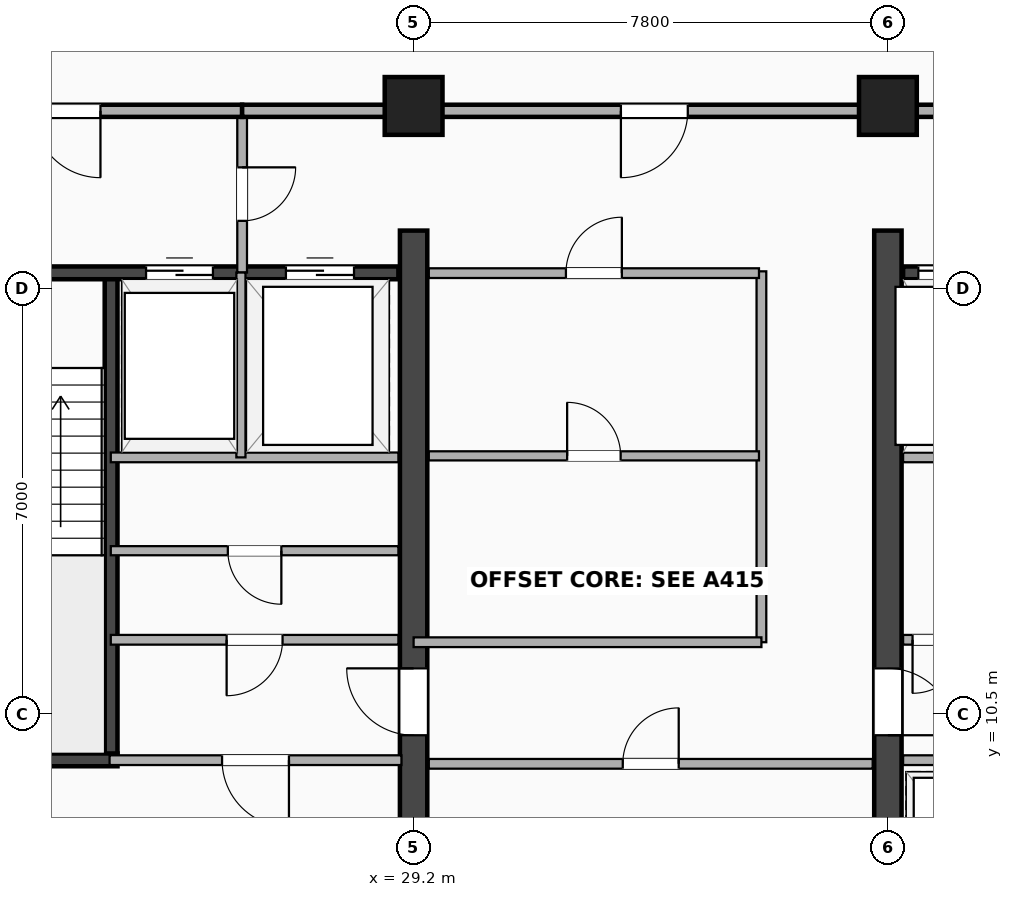
"""IFC4 building model, lengths in metres.
Left out: names, types, materials, properties, quantities, classifications, styles, units other than length and angle.
Written with IfcOpenShell. Run it as: python <this file> out.ifc"""

import sys

from ifc_helpers import new_model, si_unit, direction, frame, frame_2d, origin, origin_2d, place, context, subcontext, project, spatial, rectangle, extrude, element, fill, save


model = new_model("IFC4")
c1 = context("Model", 3, precision=1e-05, world=origin(), true_north=direction((0.0, 1.0)))
c2 = subcontext(c1, "Body", "Model", "MODEL_VIEW")
j1 = project(units=[si_unit("LENGTHUNIT", "METRE"), si_unit("PLANEANGLEUNIT", "RADIAN")], contexts=[c1])
p1 = place(None, origin())
s1 = spatial("IfcSite", under=j1, at=p1, CompositionType="ELEMENT")
p2 = place(p1, origin())
s2 = spatial("IfcBuilding", under=s1, at=p2, CompositionType="ELEMENT")
p3 = place(p2, frame((0.0, 0.0, 192.5)))
s3 = spatial("IfcBuildingStorey", under=s2, at=p3, CompositionType="ELEMENT", Elevation=192.5)
p4 = place(p3, frame((29.2, 3.5, 0.0), z_axis=(0.0, 0.0, 1.0), x_axis=(0.0, 1.0, 0.0)))
e1 = element("IfcWall", 1, at=p4, inside=s3, PredefinedType="SHEAR", context=c2, shape_type="SweptSolid", body=[
    extrude(rectangle(XDim=14.95, YDim=0.45, at=frame_2d((7.475, 0.0))), origin(), (0.0, 0.0, 1.0), 4.16),
])
p5 = place(p4, frame((7.75, 0.0, 0.0), z_axis=(0.0, 0.0, 1.0), x_axis=(-1.0, 0.0, 0.0)))
e2 = element("IfcOpeningElement", 2, at=p5, cuts=e1, PredefinedType="OPENING", context=c2, shape_type="SweptSolid", body=[
    extrude(rectangle(XDim=1.1, YDim=2.15, at=frame_2d((0.55, 1.075))), frame((0.0, 0.235, 0.0), z_axis=(0.0, -1.0, 0.0), x_axis=(1.0, 0.0, 0.0)), (0.0, 0.0, 1.0), 0.47),
])
p6 = place(p3, frame((37.0, 3.5, 0.0), z_axis=(0.0, 0.0, 1.0), x_axis=(0.0, 1.0, 0.0)))
e3 = element("IfcWall", 3, at=p6, inside=s3, PredefinedType="SHEAR", context=c2, shape_type="SweptSolid", body=[
    extrude(rectangle(XDim=14.95, YDim=0.45, at=frame_2d((7.475, 0.0))), origin(), (0.0, 0.0, 1.0), 4.16),
])
p7 = place(p6, frame((6.65, 0.0, 0.0)))
e4 = element("IfcOpeningElement", 4, at=p7, cuts=e3, PredefinedType="OPENING", context=c2, shape_type="SweptSolid", body=[
    extrude(rectangle(XDim=1.1, YDim=2.15, at=frame_2d((0.55, 1.075))), frame((0.0, 0.235, 0.0), z_axis=(0.0, -1.0, 0.0), x_axis=(1.0, 0.0, 0.0)), (0.0, 0.0, 1.0), 0.47),
])
p8 = place(p3, frame((24.225, 9.745, 0.0), z_axis=(0.0, 0.0, 1.0), x_axis=(0.0, 1.0, 0.0)))
e5 = element("IfcWall", 5, at=p8, inside=s3, PredefinedType="SHEAR", context=c2, shape_type="SweptSolid", body=[
    extrude(rectangle(XDim=8.01, YDim=0.21, at=frame_2d((4.005, 0.0))), origin(), (0.0, 0.0, 1.0), 4.16),
])
p9 = place(p3, frame((20.67, 9.745, 0.0), z_axis=(0.0, 0.0, 1.0), x_axis=(1.0, 0.0, 0.0)))
e6 = element("IfcWall", 6, at=p9, inside=s3, PredefinedType="SHEAR", context=c2, shape_type="SweptSolid", body=[
    extrude(rectangle(XDim=3.66, YDim=0.21, at=frame_2d((1.83, 0.0))), origin(), (0.0, 0.0, 1.0), 4.16),
])
p10 = place(p3, frame((20.65, 17.755, 0.0), z_axis=(0.0, 0.0, 1.0), x_axis=(1.0, 0.0, 0.0)))
e7 = element("IfcWall", 7, at=p10, inside=s3, PredefinedType="SHEAR", context=c2, shape_type="SweptSolid", body=[
    extrude(rectangle(XDim=8.3, YDim=0.21, at=frame_2d((4.15, 0.0))), origin(), (0.0, 0.0, 1.0), 4.16),
])
p11 = place(p10, frame((2.2, 0.0, 0.0), z_axis=(0.0, 0.0, 1.0), x_axis=(-1.0, 0.0, 0.0)))
e8 = element("IfcOpeningElement", 8, at=p11, cuts=e7, PredefinedType="OPENING", context=c2, shape_type="SweptSolid", body=[
    extrude(rectangle(XDim=1.05, YDim=2.15, at=frame_2d((0.525, 1.075))), frame((0.0, 0.115, 0.0), z_axis=(0.0, -1.0, 0.0), x_axis=(1.0, 0.0, 0.0)), (0.0, 0.0, 1.0), 0.23),
])
p12 = place(p10, frame((4.15, 0.0, 0.0)))
e9 = element("IfcOpeningElement", 9, at=p12, cuts=e7, PredefinedType="OPENING", context=c2, shape_type="SweptSolid", body=[
    extrude(rectangle(XDim=1.1, YDim=2.18, at=frame_2d((0.55, 1.09))), frame((0.0, 0.115, 0.0), z_axis=(0.0, -1.0, 0.0), x_axis=(1.0, 0.0, 0.0)), (0.0, 0.0, 1.0), 0.23),
])
p13 = place(p10, frame((6.45, 0.0, 0.0)))
e10 = element("IfcOpeningElement", 10, at=p13, cuts=e7, PredefinedType="OPENING", context=c2, shape_type="SweptSolid", body=[
    extrude(rectangle(XDim=1.12, YDim=2.2, at=frame_2d((0.56, 1.1))), frame((0.0, 0.115, 0.0), z_axis=(0.0, -1.0, 0.0), x_axis=(1.0, 0.0, 0.0)), (0.0, 0.0, 1.0), 0.23),
])
p14 = place(p3, frame((37.25, 17.755, 0.0), z_axis=(0.0, 0.0, 1.0), x_axis=(1.0, 0.0, 0.0)))
e11 = element("IfcWall", 11, at=p14, inside=s3, PredefinedType="SHEAR", context=c2, shape_type="SweptSolid", body=[
    extrude(rectangle(XDim=7.2, YDim=0.21, at=frame_2d((3.6, 0.0))), origin(), (0.0, 0.0, 1.0), 4.16),
])
p15 = place(p14, frame((0.25, 0.0, 0.0)))
e12 = element("IfcOpeningElement", 12, at=p15, cuts=e11, PredefinedType="OPENING", context=c2, shape_type="SweptSolid", body=[
    extrude(rectangle(XDim=1.12, YDim=2.2, at=frame_2d((0.56, 1.1))), frame((0.0, 0.115, 0.0), z_axis=(0.0, -1.0, 0.0), x_axis=(1.0, 0.0, 0.0)), (0.0, 0.0, 1.0), 0.23),
])
p16 = place(p14, frame((2.05, 0.0, 0.0)))
e13 = element("IfcOpeningElement", 13, at=p16, cuts=e11, PredefinedType="OPENING", context=c2, shape_type="SweptSolid", body=[
    extrude(rectangle(XDim=1.1, YDim=2.18, at=frame_2d((0.55, 1.09))), frame((0.0, 0.115, 0.0), z_axis=(0.0, -1.0, 0.0), x_axis=(1.0, 0.0, 0.0)), (0.0, 0.0, 1.0), 0.23),
])
p17 = place(p14, frame((5.78, 0.0, 0.0), z_axis=(0.0, 0.0, 1.0), x_axis=(-1.0, 0.0, 0.0)))
e14 = element("IfcOpeningElement", 14, at=p17, cuts=e11, PredefinedType="OPENING", context=c2, shape_type="SweptSolid", body=[
    extrude(rectangle(XDim=1.05, YDim=2.15, at=frame_2d((0.525, 1.075))), frame((0.0, 0.115, 0.0), z_axis=(0.0, -1.0, 0.0), x_axis=(1.0, 0.0, 0.0)), (0.0, 0.0, 1.0), 0.23),
])
for number, where, z_axis, x_axis in (
    (15, (29.2, 20.5, -0.24), (0.0, 0.0, 1.0), (1.0, 0.0, 0.0)),
    (16, (37.0, 20.5, -0.24), (0.0, 0.0, 1.0), (1.0, 0.0, 0.0)),
):
    element("IfcColumn", number, at=place(p3, frame(where, z_axis=z_axis, x_axis=x_axis)), inside=s3, PredefinedType="COLUMN", context=c2, shape_type="SweptSolid", body=[
        extrude(rectangle(XDim=0.95, YDim=0.95, at=origin_2d()), origin(), (0.0, 0.0, 1.0), 4.4),
    ])
p18 = place(p3, frame((26.38, 17.76, 0.0), z_axis=(0.0, 0.0, 1.0), x_axis=(0.0, 1.0, 0.0)))
e17 = element("IfcWall", 17, at=p18, inside=s3, PredefinedType="PARTITIONING", context=c2, shape_type="SweptSolid", body=[
    extrude(rectangle(XDim=2.66, YDim=0.16, at=frame_2d((1.33, 0.0))), origin(), (0.0, 0.0, 1.0), 3.606),
])
p19 = place(p18, frame((0.85, 0.0, 0.0)))
e18 = element("IfcOpeningElement", 18, at=p19, cuts=e17, PredefinedType="OPENING", context=c2, shape_type="SweptSolid", body=[
    extrude(rectangle(XDim=0.88, YDim=2.08, at=frame_2d((0.44, 1.04))), frame((0.0, 0.09, 0.0), z_axis=(0.0, -1.0, 0.0), x_axis=(1.0, 0.0, 0.0)), (0.0, 0.0, 1.0), 0.18),
])
p20 = place(p3, frame((24.22, 14.72, 0.0), z_axis=(0.0, 0.0, 1.0), x_axis=(1.0, 0.0, 0.0)))
e19 = element("IfcWall", 19, at=p20, inside=s3, PredefinedType="PARTITIONING", context=c2, shape_type="SweptSolid", body=[
    extrude(rectangle(XDim=4.73, YDim=0.16, at=frame_2d((2.365, 0.0))), origin(), (0.0, 0.0, 1.0), 4.16),
])
p21 = place(p3, frame((26.36, 14.72, 0.0), z_axis=(0.0, 0.0, 1.0), x_axis=(0.0, 1.0, 0.0)))
e20 = element("IfcWall", 20, at=p21, inside=s3, PredefinedType="PARTITIONING", context=c2, shape_type="SweptSolid", body=[
    extrude(rectangle(XDim=3.04, YDim=0.15, at=frame_2d((1.52, 0.0))), origin(), (0.0, 0.0, 1.0), 4.16),
])
p22 = place(p3, frame((37.25, 14.72, 0.0), z_axis=(0.0, 0.0, 1.0), x_axis=(1.0, 0.0, 0.0)))
e21 = element("IfcWall", 21, at=p22, inside=s3, PredefinedType="PARTITIONING", context=c2, shape_type="SweptSolid", body=[
    extrude(rectangle(XDim=3.61, YDim=0.16, at=frame_2d((1.805, 0.0))), origin(), (0.0, 0.0, 1.0), 4.16),
])
p23 = place(p3, frame((20.65, 20.42, 0.0), z_axis=(0.0, 0.0, 1.0), x_axis=(1.0, 0.0, 0.0)))
e22 = element("IfcWall", 22, at=p23, inside=s3, PredefinedType="PARTITIONING", context=c2, shape_type="SweptSolid", body=[
    extrude(rectangle(XDim=5.73, YDim=0.2, at=frame_2d((2.865, 0.0))), origin(), (0.0, 0.0, 1.0), 3.372),
])
p24 = place(p23, frame((2.3, 0.0, 0.0)))
e23 = element("IfcOpeningElement", 23, at=p24, cuts=e22, PredefinedType="OPENING", context=c2, shape_type="SweptSolid", body=[
    extrude(rectangle(XDim=1.1, YDim=2.15, at=frame_2d((0.55, 1.075))), frame((0.0, 0.11, 0.0), z_axis=(0.0, -1.0, 0.0), x_axis=(1.0, 0.0, 0.0)), (0.0, 0.0, 1.0), 0.22),
])
p25 = place(p3, frame((26.38, 20.42, 0.0), z_axis=(0.0, 0.0, 1.0), x_axis=(1.0, 0.0, 0.0)))
e24 = element("IfcWall", 24, at=p25, inside=s3, PredefinedType="PARTITIONING", context=c2, shape_type="SweptSolid", body=[
    extrude(rectangle(XDim=2.82, YDim=0.2, at=frame_2d((1.41, 0.0))), origin(), (0.0, 0.0, 1.0), 3.372),
])
p26 = place(p3, frame((29.2, 20.42, 0.0), z_axis=(0.0, 0.0, 1.0), x_axis=(1.0, 0.0, 0.0)))
e25 = element("IfcWall", 25, at=p26, inside=s3, PredefinedType="PARTITIONING", context=c2, shape_type="SweptSolid", body=[
    extrude(rectangle(XDim=7.8, YDim=0.2, at=frame_2d((3.9, 0.0))), origin(), (0.0, 0.0, 1.0), 3.372),
])
p27 = place(p26, frame((3.409, 0.0, 0.0)))
e26 = element("IfcOpeningElement", 26, at=p27, cuts=e25, PredefinedType="OPENING", context=c2, shape_type="SweptSolid", body=[
    extrude(rectangle(XDim=1.1, YDim=2.15, at=frame_2d((0.55, 1.075))), frame((0.0, 0.11, 0.0), z_axis=(0.0, -1.0, 0.0), x_axis=(1.0, 0.0, 0.0)), (0.0, 0.0, 1.0), 0.22),
])
p28 = place(p3, frame((37.0, 20.42, 0.0), z_axis=(0.0, 0.0, 1.0), x_axis=(1.0, 0.0, 0.0)))
e27 = element("IfcWall", 27, at=p28, inside=s3, PredefinedType="PARTITIONING", context=c2, shape_type="SweptSolid", body=[
    extrude(rectangle(XDim=7.45, YDim=0.2, at=frame_2d((3.725, 0.0))), origin(), (0.0, 0.0, 1.0), 3.372),
])
p29 = place(p28, frame((4.2, 0.0, 0.0)))
e28 = element("IfcOpeningElement", 28, at=p29, cuts=e27, PredefinedType="OPENING", context=c2, shape_type="SweptSolid", body=[
    extrude(rectangle(XDim=1.1, YDim=2.15, at=frame_2d((0.55, 1.075))), frame((0.0, 0.11, 0.0), z_axis=(0.0, -1.0, 0.0), x_axis=(1.0, 0.0, 0.0)), (0.0, 0.0, 1.0), 0.22),
])
p30 = place(p3, frame((24.22, 11.72, 0.0), z_axis=(0.0, 0.0, 1.0), x_axis=(1.0, 0.0, 0.0)))
e29 = element("IfcWall", 29, at=p30, inside=s3, PredefinedType="PARTITIONING", context=c2, shape_type="SweptSolid", body=[
    extrude(rectangle(XDim=4.73, YDim=0.16, at=frame_2d((2.365, 0.0))), origin(), (0.0, 0.0, 1.0), 4.16),
])
p31 = place(p30, frame((1.905, 0.0, 0.0)))
e30 = element("IfcOpeningElement", 30, at=p31, cuts=e29, PredefinedType="OPENING", context=c2, shape_type="SweptSolid", body=[
    extrude(rectangle(XDim=0.92, YDim=2.08, at=frame_2d((0.46, 1.04))), frame((0.0, 0.09, 0.0), z_axis=(0.0, -1.0, 0.0), x_axis=(1.0, 0.0, 0.0)), (0.0, 0.0, 1.0), 0.18),
])
p32 = place(p3, frame((24.22, 13.185, 0.0), z_axis=(0.0, 0.0, 1.0), x_axis=(1.0, 0.0, 0.0)))
e31 = element("IfcWall", 31, at=p32, inside=s3, PredefinedType="PARTITIONING", context=c2, shape_type="SweptSolid", body=[
    extrude(rectangle(XDim=4.73, YDim=0.15, at=frame_2d((2.365, 0.0))), origin(), (0.0, 0.0, 1.0), 4.16),
])
p33 = place(p32, frame((1.925, 0.0, 0.0)))
e32 = element("IfcOpeningElement", 32, at=p33, cuts=e31, PredefinedType="OPENING", context=c2, shape_type="SweptSolid", body=[
    extrude(rectangle(XDim=0.88, YDim=2.08, at=frame_2d((0.44, 1.04))), frame((0.0, 0.085, 0.0), z_axis=(0.0, -1.0, 0.0), x_axis=(1.0, 0.0, 0.0)), (0.0, 0.0, 1.0), 0.17),
])
p34 = place(p3, frame((37.25, 11.72, 0.0), z_axis=(0.0, 0.0, 1.0), x_axis=(1.0, 0.0, 0.0)))
e33 = element("IfcWall", 33, at=p34, inside=s3, PredefinedType="PARTITIONING", context=c2, shape_type="SweptSolid", body=[
    extrude(rectangle(XDim=1.191, YDim=0.16, at=frame_2d((0.596, 0.0))), origin(), (0.0, 0.0, 1.0), 4.16),
])
p35 = place(p34, frame((0.156, 0.0, 0.0)))
e34 = element("IfcOpeningElement", 34, at=p35, cuts=e33, PredefinedType="OPENING", context=c2, shape_type="SweptSolid", body=[
    extrude(rectangle(XDim=0.88, YDim=2.08, at=frame_2d((0.44, 1.04))), frame((0.0, 0.09, 0.0), z_axis=(0.0, -1.0, 0.0), x_axis=(1.0, 0.0, 0.0)), (0.0, 0.0, 1.0), 0.18),
])
p36 = place(p3, frame((24.2, 9.74, 0.0), z_axis=(0.0, 0.0, 1.0), x_axis=(1.0, 0.0, 0.0)))
e35 = element("IfcWall", 35, at=p36, inside=s3, PredefinedType="PARTITIONING", context=c2, shape_type="SweptSolid", body=[
    extrude(rectangle(XDim=4.8, YDim=0.16, at=frame_2d((2.4, 0.0))), origin(), (0.0, 0.0, 1.0), 4.16),
])
p37 = place(p36, frame((1.85, 0.0, 0.0)))
e36 = element("IfcOpeningElement", 36, at=p37, cuts=e35, PredefinedType="OPENING", context=c2, shape_type="SweptSolid", body=[
    extrude(rectangle(XDim=1.1, YDim=2.15, at=frame_2d((0.55, 1.075))), frame((0.0, 0.09, 0.0), z_axis=(0.0, -1.0, 0.0), x_axis=(1.0, 0.0, 0.0)), (0.0, 0.0, 1.0), 0.18),
])
p38 = place(p3, frame((37.25, 9.74, 0.0), z_axis=(0.0, 0.0, 1.0), x_axis=(1.0, 0.0, 0.0)))
e37 = element("IfcWall", 37, at=p38, inside=s3, PredefinedType="PARTITIONING", context=c2, shape_type="SweptSolid", body=[
    extrude(rectangle(XDim=2.17, YDim=0.16, at=frame_2d((1.085, 0.0))), origin(), (0.0, 0.0, 1.0), 4.16),
])
p39 = place(p3, frame((34.92, 11.68, 0.0), z_axis=(0.0, 0.0, 1.0), x_axis=(0.0, 1.0, 0.0)))
e38 = element("IfcWall", 38, at=p39, inside=s3, PredefinedType="PARTITIONING", context=c2, shape_type="SweptSolid", body=[
    extrude(rectangle(XDim=6.1, YDim=0.16, at=frame_2d((3.05, 0.0))), origin(), (0.0, 0.0, 1.0), 4.16),
])
p40 = place(p3, frame((29.45, 9.68, 0.0), z_axis=(0.0, 0.0, 1.0), x_axis=(1.0, 0.0, 0.0)))
e39 = element("IfcWall", 39, at=p40, inside=s3, PredefinedType="PARTITIONING", context=c2, shape_type="SweptSolid", body=[
    extrude(rectangle(XDim=7.3, YDim=0.16, at=frame_2d((3.65, 0.0))), origin(), (0.0, 0.0, 1.0), 4.16),
])
p41 = place(p40, frame((4.11, 0.0, 0.0), z_axis=(0.0, 0.0, 1.0), x_axis=(-1.0, 0.0, 0.0)))
e40 = element("IfcOpeningElement", 40, at=p41, cuts=e39, PredefinedType="OPENING", context=c2, shape_type="SweptSolid", body=[
    extrude(rectangle(XDim=0.92, YDim=2.08, at=frame_2d((0.46, 1.04))), frame((0.0, 0.09, 0.0), z_axis=(0.0, -1.0, 0.0), x_axis=(1.0, 0.0, 0.0)), (0.0, 0.0, 1.0), 0.18),
])
p42 = place(p3, frame((29.2, 11.68, 0.0), z_axis=(0.0, 0.0, 1.0), x_axis=(1.0, 0.0, 0.0)))
e41 = element("IfcWall", 41, at=p42, inside=s3, PredefinedType="PARTITIONING", context=c2, shape_type="SweptSolid", body=[
    extrude(rectangle(XDim=5.72, YDim=0.16, at=frame_2d((2.86, 0.0))), origin(), (0.0, 0.0, 1.0), 4.16),
])
p43 = place(p3, frame((29.45, 17.75, 0.0), z_axis=(0.0, 0.0, 1.0), x_axis=(1.0, 0.0, 0.0)))
e42 = element("IfcWall", 42, at=p43, inside=s3, PredefinedType="PARTITIONING", context=c2, shape_type="SweptSolid", body=[
    extrude(rectangle(XDim=5.43, YDim=0.16, at=frame_2d((2.715, 0.0))), origin(), (0.0, 0.0, 1.0), 4.16),
])
p44 = place(p43, frame((3.175, 0.0, 0.0), z_axis=(0.0, 0.0, 1.0), x_axis=(-1.0, 0.0, 0.0)))
e43 = element("IfcOpeningElement", 43, at=p44, cuts=e42, PredefinedType="OPENING", context=c2, shape_type="SweptSolid", body=[
    extrude(rectangle(XDim=0.92, YDim=2.08, at=frame_2d((0.46, 1.04))), frame((0.0, 0.09, 0.0), z_axis=(0.0, -1.0, 0.0), x_axis=(1.0, 0.0, 0.0)), (0.0, 0.0, 1.0), 0.18),
])
p45 = place(p3, frame((29.45, 14.745, 0.0), z_axis=(0.0, 0.0, 1.0), x_axis=(1.0, 0.0, 0.0)))
e44 = element("IfcWall", 44, at=p45, inside=s3, PredefinedType="PARTITIONING", context=c2, shape_type="SweptSolid", body=[
    extrude(rectangle(XDim=5.43, YDim=0.15, at=frame_2d((2.715, 0.0))), origin(), (0.0, 0.0, 1.0), 4.16),
])
p46 = place(p45, frame((3.155, 0.0, 0.0), z_axis=(0.0, 0.0, 1.0), x_axis=(-1.0, 0.0, 0.0)))
e45 = element("IfcOpeningElement", 45, at=p46, cuts=e44, PredefinedType="OPENING", context=c2, shape_type="SweptSolid", body=[
    extrude(rectangle(XDim=0.88, YDim=2.08, at=frame_2d((0.44, 1.04))), frame((0.0, 0.085, 0.0), z_axis=(0.0, -1.0, 0.0), x_axis=(1.0, 0.0, 0.0)), (0.0, 0.0, 1.0), 0.17),
])
p47 = place(p12, origin())
e46 = element("IfcDoor", 46, at=p47, inside=s3, OperationType="DOUBLE_DOOR_SLIDING", PredefinedType="DOOR", context=c2, shape_type="SweptSolid", body=[
    extrude(rectangle(XDim=1.1, YDim=2.18, at=frame_2d((0.55, 1.09))), frame((0.0, 0.025, 0.0), z_axis=(0.0, -1.0, 0.0), x_axis=(1.0, 0.0, 0.0)), (0.0, 0.0, 1.0), 0.05),
])
fill(e9, e46)
p48 = place(p13, origin())
e47 = element("IfcDoor", 47, at=p48, inside=s3, OperationType="DOUBLE_DOOR_SLIDING", PredefinedType="DOOR", context=c2, shape_type="SweptSolid", body=[
    extrude(rectangle(XDim=1.12, YDim=2.2, at=frame_2d((0.56, 1.1))), frame((0.0, 0.025, 0.0), z_axis=(0.0, -1.0, 0.0), x_axis=(1.0, 0.0, 0.0)), (0.0, 0.0, 1.0), 0.05),
])
fill(e10, e47)
p49 = place(p15, origin())
e48 = element("IfcDoor", 48, at=p49, inside=s3, OperationType="DOUBLE_DOOR_SLIDING", PredefinedType="DOOR", context=c2, shape_type="SweptSolid", body=[
    extrude(rectangle(XDim=1.12, YDim=2.2, at=frame_2d((0.56, 1.1))), frame((0.0, 0.025, 0.0), z_axis=(0.0, -1.0, 0.0), x_axis=(1.0, 0.0, 0.0)), (0.0, 0.0, 1.0), 0.05),
])
fill(e12, e48)
p50 = place(p5, origin())
e49 = element("IfcDoor", 49, at=p50, inside=s3, OperationType="SINGLE_SWING_RIGHT", PredefinedType="DOOR", context=c2, shape_type="SweptSolid", body=[
    extrude(rectangle(XDim=1.1, YDim=2.15, at=frame_2d((0.55, 1.075))), frame((0.0, 0.025, 0.0), z_axis=(0.0, -1.0, 0.0), x_axis=(1.0, 0.0, 0.0)), (0.0, 0.0, 1.0), 0.05),
])
fill(e2, e49)
p51 = place(p7, origin())
e50 = element("IfcDoor", 50, at=p51, inside=s3, OperationType="SINGLE_SWING_LEFT", PredefinedType="DOOR", context=c2, shape_type="SweptSolid", body=[
    extrude(rectangle(XDim=1.1, YDim=2.15, at=frame_2d((0.55, 1.075))), frame((0.0, 0.025, 0.0), z_axis=(0.0, -1.0, 0.0), x_axis=(1.0, 0.0, 0.0)), (0.0, 0.0, 1.0), 0.05),
])
fill(e4, e50)
p52 = place(p19, origin())
e51 = element("IfcDoor", 51, at=p52, inside=s3, OperationType="SINGLE_SWING_RIGHT", PredefinedType="DOOR", context=c2, shape_type="SweptSolid", body=[
    extrude(rectangle(XDim=0.88, YDim=2.08, at=frame_2d((0.44, 1.04))), frame((0.0, 0.025, 0.0), z_axis=(0.0, -1.0, 0.0), x_axis=(1.0, 0.0, 0.0)), (0.0, 0.0, 1.0), 0.05),
])
fill(e18, e51)
p53 = place(p24, origin())
e52 = element("IfcDoor", 52, at=p53, inside=s3, OperationType="SINGLE_SWING_RIGHT", PredefinedType="DOOR", context=c2, shape_type="SweptSolid", body=[
    extrude(rectangle(XDim=1.1, YDim=2.15, at=frame_2d((0.55, 1.075))), frame((0.0, 0.025, 0.0), z_axis=(0.0, -1.0, 0.0), x_axis=(1.0, 0.0, 0.0)), (0.0, 0.0, 1.0), 0.05),
])
fill(e23, e52)
p54 = place(p27, origin())
e53 = element("IfcDoor", 53, at=p54, inside=s3, OperationType="SINGLE_SWING_LEFT", PredefinedType="DOOR", context=c2, shape_type="SweptSolid", body=[
    extrude(rectangle(XDim=1.1, YDim=2.15, at=frame_2d((0.55, 1.075))), frame((0.0, 0.025, 0.0), z_axis=(0.0, -1.0, 0.0), x_axis=(1.0, 0.0, 0.0)), (0.0, 0.0, 1.0), 0.05),
])
fill(e26, e53)
p55 = place(p31, origin())
e54 = element("IfcDoor", 54, at=p55, inside=s3, OperationType="SINGLE_SWING_LEFT", PredefinedType="DOOR", context=c2, shape_type="SweptSolid", body=[
    extrude(rectangle(XDim=0.92, YDim=2.08, at=frame_2d((0.46, 1.04))), frame((0.0, 0.025, 0.0), z_axis=(0.0, -1.0, 0.0), x_axis=(1.0, 0.0, 0.0)), (0.0, 0.0, 1.0), 0.05),
])
fill(e30, e54)
p56 = place(p33, origin())
e55 = element("IfcDoor", 55, at=p56, inside=s3, OperationType="SINGLE_SWING_RIGHT", PredefinedType="DOOR", context=c2, shape_type="SweptSolid", body=[
    extrude(rectangle(XDim=0.88, YDim=2.08, at=frame_2d((0.44, 1.04))), frame((0.0, 0.025, 0.0), z_axis=(0.0, -1.0, 0.0), x_axis=(1.0, 0.0, 0.0)), (0.0, 0.0, 1.0), 0.05),
])
fill(e32, e55)
p57 = place(p35, origin())
e56 = element("IfcDoor", 56, at=p57, inside=s3, OperationType="SINGLE_SWING_LEFT", PredefinedType="DOOR", context=c2, shape_type="SweptSolid", body=[
    extrude(rectangle(XDim=0.88, YDim=2.08, at=frame_2d((0.44, 1.04))), frame((0.0, 0.025, 0.0), z_axis=(0.0, -1.0, 0.0), x_axis=(1.0, 0.0, 0.0)), (0.0, 0.0, 1.0), 0.05),
])
fill(e34, e56)
p58 = place(p37, origin())
e57 = element("IfcDoor", 57, at=p58, inside=s3, OperationType="SINGLE_SWING_RIGHT", PredefinedType="DOOR", context=c2, shape_type="SweptSolid", body=[
    extrude(rectangle(XDim=1.1, YDim=2.15, at=frame_2d((0.55, 1.075))), frame((0.0, 0.025, 0.0), z_axis=(0.0, -1.0, 0.0), x_axis=(1.0, 0.0, 0.0)), (0.0, 0.0, 1.0), 0.05),
])
fill(e36, e57)
p59 = place(p41, origin())
e58 = element("IfcDoor", 58, at=p59, inside=s3, OperationType="SINGLE_SWING_RIGHT", PredefinedType="DOOR", context=c2, shape_type="SweptSolid", body=[
    extrude(rectangle(XDim=0.92, YDim=2.08, at=frame_2d((0.46, 1.04))), frame((0.0, 0.025, 0.0), z_axis=(0.0, -1.0, 0.0), x_axis=(1.0, 0.0, 0.0)), (0.0, 0.0, 1.0), 0.05),
])
fill(e40, e58)
p60 = place(p44, origin())
e59 = element("IfcDoor", 59, at=p60, inside=s3, OperationType="SINGLE_SWING_RIGHT", PredefinedType="DOOR", context=c2, shape_type="SweptSolid", body=[
    extrude(rectangle(XDim=0.92, YDim=2.08, at=frame_2d((0.46, 1.04))), frame((0.0, 0.025, 0.0), z_axis=(0.0, -1.0, 0.0), x_axis=(1.0, 0.0, 0.0)), (0.0, 0.0, 1.0), 0.05),
])
fill(e43, e59)
p61 = place(p46, origin())
e60 = element("IfcDoor", 60, at=p61, inside=s3, OperationType="SINGLE_SWING_LEFT", PredefinedType="DOOR", context=c2, shape_type="SweptSolid", body=[
    extrude(rectangle(XDim=0.88, YDim=2.08, at=frame_2d((0.44, 1.04))), frame((0.0, 0.025, 0.0), z_axis=(0.0, -1.0, 0.0), x_axis=(1.0, 0.0, 0.0)), (0.0, 0.0, 1.0), 0.05),
])
fill(e45, e60)
save(model, sys.argv[1])
